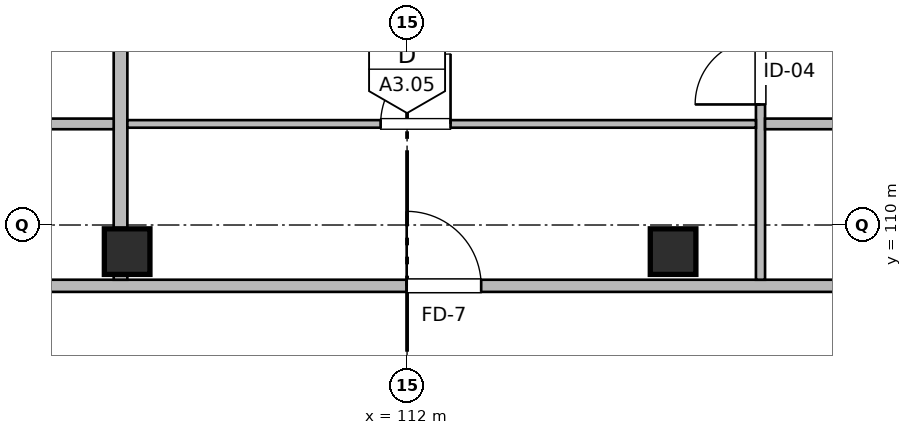
"""IFC4 building model, lengths in metres.
Left out: names, types, materials, properties, quantities, classifications, styles, units other than length and angle.
Written with IfcOpenShell. Run it as: python <this file> out.ifc"""

import sys

from ifc_helpers import new_model, si_unit, direction, frame, frame_2d, origin, origin_2d, place, context, subcontext, project, spatial, rectangle, extrude, element, fill, save


model = new_model("IFC4")
c1 = context("Model", 3, precision=1e-05, world=origin(), true_north=direction((0.0, 1.0)))
c2 = subcontext(c1, "Body", "Model", "MODEL_VIEW")
j1 = project(units=[si_unit("LENGTHUNIT", "METRE"), si_unit("PLANEANGLEUNIT", "RADIAN")], contexts=[c1])
p1 = place(None, origin())
s1 = spatial("IfcSite", under=j1, at=p1, CompositionType="ELEMENT")
p2 = place(p1, origin())
s2 = spatial("IfcBuilding", under=s1, at=p2, CompositionType="ELEMENT")
p3 = place(p2, frame((0.0, 0.0, 10.56)))
s3 = spatial("IfcBuildingStorey", under=s2, at=p3, CompositionType="ELEMENT", Elevation=10.56)
for number, where, z_axis, x_axis in (
    (1, (108.317, 109.65, 0.0), (0.0, 0.0, 1.0), (1.0, 0.0, 0.0)),
    (2, (115.5, 109.65, 0.0), (0.0, 0.0, 1.0), (1.0, 0.0, 0.0)),
):
    element("IfcColumn", number, at=place(p3, frame(where, z_axis=z_axis, x_axis=x_axis)), inside=s3, PredefinedType="COLUMN", context=c2, shape_type="SweptSolid", body=[
        extrude(rectangle(XDim=0.6, YDim=0.6, at=origin_2d()), origin(), (0.0, 0.0, 1.0), 3.2),
    ])
p4 = place(p3, frame((93.68, 109.2, 0.0), z_axis=(0.0, 0.0, 1.0), x_axis=(1.0, 0.0, 0.0)))
e3 = element("IfcWall", 3, at=p4, inside=s3, PredefinedType="PARTITIONING", context=c2, shape_type="SweptSolid", body=[
    extrude(rectangle(XDim=43.64, YDim=0.16, at=frame_2d((21.82, 0.0))), origin(), (0.0, 0.0, 1.0), 2.935),
])
p5 = place(p4, frame((3.705, 0.0, 0.0)))
e4 = element("IfcOpeningElement", 4, at=p5, cuts=e3, PredefinedType="OPENING", context=c2, shape_type="SweptSolid", body=[
    extrude(rectangle(XDim=0.98, YDim=2.15, at=frame_2d((0.49, 1.075))), frame((0.0, 0.09, 0.0), z_axis=(0.0, -1.0, 0.0), x_axis=(1.0, 0.0, 0.0)), (0.0, 0.0, 1.0), 0.18),
])
p6 = place(p4, frame((18.315, 0.0, 0.0)))
e5 = element("IfcOpeningElement", 5, at=p6, cuts=e3, PredefinedType="OPENING", context=c2, shape_type="SweptSolid", body=[
    extrude(rectangle(XDim=0.98, YDim=2.15, at=frame_2d((0.49, 1.075))), frame((0.0, 0.09, 0.0), z_axis=(0.0, -1.0, 0.0), x_axis=(1.0, 0.0, 0.0)), (0.0, 0.0, 1.0), 0.18),
])
p7 = place(p4, frame((32.885, 0.0, 0.0)))
e6 = element("IfcOpeningElement", 6, at=p7, cuts=e3, PredefinedType="OPENING", context=c2, shape_type="SweptSolid", body=[
    extrude(rectangle(XDim=0.98, YDim=2.15, at=frame_2d((0.49, 1.075))), frame((0.0, 0.09, 0.0), z_axis=(0.0, -1.0, 0.0), x_axis=(1.0, 0.0, 0.0)), (0.0, 0.0, 1.0), 0.18),
])
p8 = place(p3, frame((108.23, 109.28, 0.0), z_axis=(0.0, 0.0, 1.0), x_axis=(0.0, 1.0, 0.0)))
e7 = element("IfcWall", 7, at=p8, inside=s3, PredefinedType="PARTITIONING", context=c2, shape_type="SweptSolid", body=[
    extrude(rectangle(XDim=6.6, YDim=0.18, at=frame_2d((3.3, 0.0))), origin(), (0.0, 0.0, 1.0), 2.68),
])
p9 = place(p3, frame((102.13, 111.33, 0.0), z_axis=(0.0, 0.0, 1.0), x_axis=(1.0, 0.0, 0.0)))
e8 = element("IfcWall", 8, at=p9, inside=s3, PredefinedType="PARTITIONING", context=c2, shape_type="SweptSolid", body=[
    extrude(rectangle(XDim=6.01, YDim=0.14, at=frame_2d((3.005, 0.0))), origin(), (0.0, 0.0, 1.0), 2.935),
])
p10 = place(p9, frame((2.428, 0.0, 0.0)))
e9 = element("IfcOpeningElement", 9, at=p10, cuts=e8, PredefinedType="OPENING", context=c2, shape_type="SweptSolid", body=[
    extrude(rectangle(XDim=0.85, YDim=2.05, at=frame_2d((0.425, 1.025))), frame((0.0, 0.08, 0.0), z_axis=(0.0, -1.0, 0.0), x_axis=(1.0, 0.0, 0.0)), (0.0, 0.0, 1.0), 0.16),
])
p11 = place(p3, frame((116.65, 109.28, 0.0), z_axis=(0.0, 0.0, 1.0), x_axis=(0.0, 1.0, 0.0)))
e10 = element("IfcWall", 10, at=p11, inside=s3, PredefinedType="PARTITIONING", context=c2, shape_type="SweptSolid", body=[
    extrude(rectangle(XDim=6.6, YDim=0.12, at=frame_2d((3.3, 0.0))), origin(), (0.0, 0.0, 1.0), 2.935),
])
p12 = place(p11, frame((2.306, 0.0, 0.0)))
e11 = element("IfcOpeningElement", 11, at=p12, cuts=e10, PredefinedType="OPENING", context=c2, shape_type="SweptSolid", body=[
    extrude(rectangle(XDim=0.86, YDim=2.1, at=frame_2d((0.43, 1.05))), frame((0.0, 0.07, 0.0), z_axis=(0.0, -1.0, 0.0), x_axis=(1.0, 0.0, 0.0)), (0.0, 0.0, 1.0), 0.14),
])
p13 = place(p11, frame((4.097, 0.0, 0.0)))
e12 = element("IfcOpeningElement", 12, at=p13, cuts=e10, PredefinedType="OPENING", context=c2, shape_type="SweptSolid", body=[
    extrude(rectangle(XDim=0.9, YDim=2.1, at=frame_2d((0.45, 1.05))), frame((0.0, 0.07, 0.0), z_axis=(0.0, -1.0, 0.0), x_axis=(1.0, 0.0, 0.0)), (0.0, 0.0, 1.0), 0.14),
])
p14 = place(p3, frame((116.71, 111.33, 0.0), z_axis=(0.0, 0.0, 1.0), x_axis=(1.0, 0.0, 0.0)))
e13 = element("IfcWall", 13, at=p14, inside=s3, PredefinedType="PARTITIONING", context=c2, shape_type="SweptSolid", body=[
    extrude(rectangle(XDim=5.97, YDim=0.14, at=frame_2d((2.985, 0.0))), origin(), (0.0, 0.0, 1.0), 2.935),
])
p15 = place(p14, frame((2.412, 0.0, 0.0)))
e14 = element("IfcOpeningElement", 14, at=p15, cuts=e13, PredefinedType="OPENING", context=c2, shape_type="SweptSolid", body=[
    extrude(rectangle(XDim=0.85, YDim=2.05, at=frame_2d((0.425, 1.025))), frame((0.0, 0.08, 0.0), z_axis=(0.0, -1.0, 0.0), x_axis=(1.0, 0.0, 0.0)), (0.0, 0.0, 1.0), 0.16),
])
p16 = place(p3, frame((108.32, 111.33, 0.0), z_axis=(0.0, 0.0, 1.0), x_axis=(1.0, 0.0, 0.0)))
e15 = element("IfcWall", 15, at=p16, inside=s3, PredefinedType="PARTITIONING", context=c2, shape_type="SweptSolid", body=[
    extrude(rectangle(XDim=8.27, YDim=0.1, at=frame_2d((4.135, 0.0))), origin(), (0.0, 0.0, 1.0), 2.935),
])
p17 = place(p16, frame((3.332, 0.0, 0.0)))
e16 = element("IfcOpeningElement", 16, at=p17, cuts=e15, PredefinedType="OPENING", context=c2, shape_type="SweptSolid", body=[
    extrude(rectangle(XDim=0.92, YDim=2.1, at=frame_2d((0.46, 1.05))), frame((0.0, 0.06, 0.0), z_axis=(0.0, -1.0, 0.0), x_axis=(1.0, 0.0, 0.0)), (0.0, 0.0, 1.0), 0.12),
])
p18 = place(p6, origin())
e17 = element("IfcDoor", 17, at=p18, inside=s3, OperationType="SINGLE_SWING_LEFT", PredefinedType="DOOR", context=c2, shape_type="SweptSolid", body=[
    extrude(rectangle(XDim=0.98, YDim=2.15, at=frame_2d((0.49, 1.075))), frame((0.0, 0.025, 0.0), z_axis=(0.0, -1.0, 0.0), x_axis=(1.0, 0.0, 0.0)), (0.0, 0.0, 1.0), 0.05),
])
fill(e5, e17)
p19 = place(p17, origin())
e18 = element("IfcDoor", 18, at=p19, inside=s3, OperationType="SINGLE_SWING_RIGHT", PredefinedType="DOOR", context=c2, shape_type="SweptSolid", body=[
    extrude(rectangle(XDim=0.92, YDim=2.1, at=frame_2d((0.46, 1.05))), frame((0.0, 0.025, 0.0), z_axis=(0.0, -1.0, 0.0), x_axis=(1.0, 0.0, 0.0)), (0.0, 0.0, 1.0), 0.05),
])
fill(e16, e18)
p20 = place(p12, origin())
e19 = element("IfcDoor", 19, at=p20, inside=s3, OperationType="SINGLE_SWING_LEFT", PredefinedType="DOOR", context=c2, shape_type="SweptSolid", body=[
    extrude(rectangle(XDim=0.86, YDim=2.1, at=frame_2d((0.43, 1.05))), frame((0.0, 0.025, 0.0), z_axis=(0.0, -1.0, 0.0), x_axis=(1.0, 0.0, 0.0)), (0.0, 0.0, 1.0), 0.05),
])
fill(e11, e19)
save(model, sys.argv[1])
